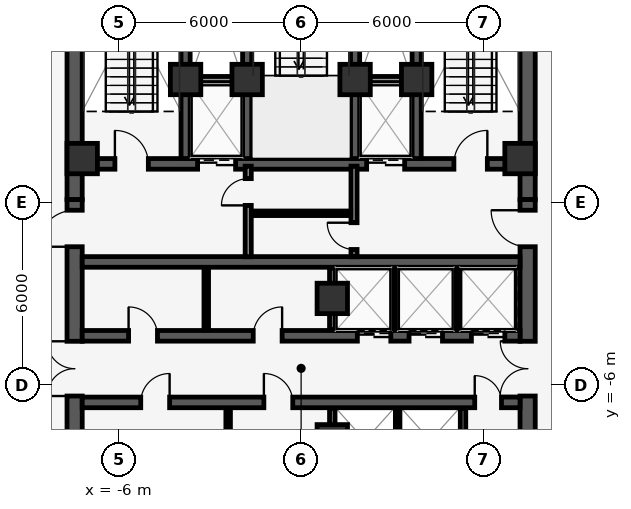
"""IFC4 building model, lengths in metres.
Left out: names, types, materials, properties, quantities, classifications, styles, units other than length and angle.
Written with IfcOpenShell. Run it as: python <this file> out.ifc"""

import sys

from ifc_helpers import new_model, si_unit, direction, frame, frame_2d, origin, origin_2d, place, context, subcontext, project, spatial, rectangle, extrude, element, fill, save


model = new_model("IFC4")
c1 = context("Model", 3, precision=1e-05, world=origin(), true_north=direction((0.0, 1.0)))
c2 = subcontext(c1, "Body", "Model", "MODEL_VIEW")
j1 = project(units=[si_unit("LENGTHUNIT", "METRE"), si_unit("PLANEANGLEUNIT", "RADIAN")], contexts=[c1])
p1 = place(None, origin())
s1 = spatial("IfcSite", under=j1, at=p1, CompositionType="ELEMENT")
p2 = place(p1, origin())
s2 = spatial("IfcBuilding", under=s1, at=p2, CompositionType="ELEMENT")
p3 = place(p2, frame((0.0, 0.0, 260.9)))
s3 = spatial("IfcBuildingStorey", under=s2, at=p3, CompositionType="ELEMENT", Elevation=260.9)
p4 = place(p3, frame((-7.2, 1.275, 0.0), z_axis=(0.0, 0.0, 1.0), x_axis=(1.0, 0.0, 0.0)))
e1 = element("IfcWall", 1, at=p4, inside=s3, PredefinedType="SHEAR", context=c2, shape_type="SweptSolid", body=[
    extrude(rectangle(XDim=14.4, YDim=0.35, at=frame_2d((7.2, 0.0))), origin(), (0.0, 0.0, 1.0), 4.35),
])
p5 = place(p4, frame((3.795, 0.0, 0.0)))
e2 = element("IfcOpeningElement", 2, at=p5, cuts=e1, PredefinedType="OPENING", context=c2, shape_type="SweptSolid", body=[
    extrude(rectangle(XDim=1.25, YDim=2.25, at=frame_2d((0.625, 1.125))), frame((0.0, 0.185, 0.0), z_axis=(0.0, -1.0, 0.0), x_axis=(1.0, 0.0, 0.0)), (0.0, 0.0, 1.0), 0.37),
])
p6 = place(p4, frame((9.355, 0.0, 0.0)))
e3 = element("IfcOpeningElement", 3, at=p6, cuts=e1, PredefinedType="OPENING", context=c2, shape_type="SweptSolid", body=[
    extrude(rectangle(XDim=1.25, YDim=2.25, at=frame_2d((0.625, 1.125))), frame((0.0, 0.185, 0.0), z_axis=(0.0, -1.0, 0.0), x_axis=(1.0, 0.0, 0.0)), (0.0, 0.0, 1.0), 0.37),
])
p7 = place(p4, frame((1.075, 0.0, 0.0)))
e4 = element("IfcOpeningElement", 4, at=p7, cuts=e1, PredefinedType="OPENING", context=c2, shape_type="SweptSolid", body=[
    extrude(rectangle(XDim=1.1, YDim=2.15, at=frame_2d((0.55, 1.075))), frame((0.0, 0.185, 0.0), z_axis=(0.0, -1.0, 0.0), x_axis=(1.0, 0.0, 0.0)), (0.0, 0.0, 1.0), 0.37),
])
p8 = place(p4, frame((12.225, 0.0, 0.0)))
e5 = element("IfcOpeningElement", 5, at=p8, cuts=e1, PredefinedType="OPENING", context=c2, shape_type="SweptSolid", body=[
    extrude(rectangle(XDim=1.1, YDim=2.15, at=frame_2d((0.55, 1.075))), frame((0.0, 0.185, 0.0), z_axis=(0.0, -1.0, 0.0), x_axis=(1.0, 0.0, 0.0)), (0.0, 0.0, 1.0), 0.37),
])
for number, where, z_axis, x_axis in (
    (6, (-3.8, 1.45, 0.0), (0.0, 0.0, 1.0), (0.0, 1.0, 0.0)),
    (7, (-1.775, 1.45, 0.0), (0.0, 0.0, 1.0), (0.0, 1.0, 0.0)),
    (8, (1.775, 1.45, 0.0), (0.0, 0.0, 1.0), (0.0, 1.0, 0.0)),
    (9, (3.8, 1.45, 0.0), (0.0, 0.0, 1.0), (0.0, 1.0, 0.0)),
):
    element("IfcWall", number, at=place(p3, frame(where, z_axis=z_axis, x_axis=x_axis)), inside=s3, PredefinedType="SHEAR", context=c2, shape_type="SweptSolid", body=[
        extrude(rectangle(XDim=7.7, YDim=0.3, at=frame_2d((3.85, 0.0))), origin(), (0.0, 0.0, 1.0), 4.35),
    ])
for number, where, z_axis, x_axis in (
    (10, (-7.45, 0.1, 0.0), (0.0, 0.0, 1.0), (0.0, 1.0, 0.0)),
    (11, (7.45, 0.1, 0.0), (0.0, 0.0, 1.0), (0.0, 1.0, 0.0)),
):
    element("IfcWall", number, at=place(p3, frame(where, z_axis=z_axis, x_axis=x_axis)), inside=s3, PredefinedType="SHEAR", context=c2, shape_type="SweptSolid", body=[
        extrude(rectangle(XDim=9.05, YDim=0.5, at=frame_2d((4.525, 0.0))), origin(), (0.0, 0.0, 1.0), 4.35),
    ])
p9 = place(p3, frame((-7.45, -9.0, 0.0), z_axis=(0.0, 0.0, 1.0), x_axis=(0.0, 1.0, 0.0)))
e12 = element("IfcWall", 12, at=p9, inside=s3, PredefinedType="SHEAR", context=c2, shape_type="SweptSolid", body=[
    extrude(rectangle(XDim=9.1, YDim=0.5, at=frame_2d((4.55, 0.0))), origin(), (0.0, 0.0, 1.0), 4.35),
])
p10 = place(p9, frame((2.64, 0.0, 0.0)))
e13 = element("IfcOpeningElement", 13, at=p10, cuts=e12, PredefinedType="OPENING", context=c2, shape_type="SweptSolid", body=[
    extrude(rectangle(XDim=1.8, YDim=2.2, at=frame_2d((0.9, 1.1))), frame((0.0, 0.26, 0.0), z_axis=(0.0, -1.0, 0.0), x_axis=(1.0, 0.0, 0.0)), (0.0, 0.0, 1.0), 0.52),
])
p11 = place(p9, frame((7.55, 0.0, 0.0)))
e14 = element("IfcOpeningElement", 14, at=p11, cuts=e12, PredefinedType="OPENING", context=c2, shape_type="SweptSolid", body=[
    extrude(rectangle(XDim=1.2, YDim=2.15, at=frame_2d((0.6, 1.075))), frame((0.0, 0.26, 0.0), z_axis=(0.0, -1.0, 0.0), x_axis=(1.0, 0.0, 0.0)), (0.0, 0.0, 1.0), 0.52),
])
p12 = place(p3, frame((7.45, -9.0, 0.0), z_axis=(0.0, 0.0, 1.0), x_axis=(0.0, 1.0, 0.0)))
e15 = element("IfcWall", 15, at=p12, inside=s3, PredefinedType="SHEAR", context=c2, shape_type="SweptSolid", body=[
    extrude(rectangle(XDim=9.1, YDim=0.5, at=frame_2d((4.55, 0.0))), origin(), (0.0, 0.0, 1.0), 4.35),
])
p13 = place(p12, frame((2.64, 0.0, 0.0)))
e16 = element("IfcOpeningElement", 16, at=p13, cuts=e15, PredefinedType="OPENING", context=c2, shape_type="SweptSolid", body=[
    extrude(rectangle(XDim=1.8, YDim=2.2, at=frame_2d((0.9, 1.1))), frame((0.0, 0.26, 0.0), z_axis=(0.0, -1.0, 0.0), x_axis=(1.0, 0.0, 0.0)), (0.0, 0.0, 1.0), 0.52),
])
p14 = place(p12, frame((7.55, 0.0, 0.0)))
e17 = element("IfcOpeningElement", 17, at=p14, cuts=e15, PredefinedType="OPENING", context=c2, shape_type="SweptSolid", body=[
    extrude(rectangle(XDim=1.2, YDim=2.15, at=frame_2d((0.6, 1.075))), frame((0.0, 0.26, 0.0), z_axis=(0.0, -1.0, 0.0), x_axis=(1.0, 0.0, 0.0)), (0.0, 0.0, 1.0), 0.52),
])
p15 = place(p3, frame((-7.2, -1.95, 0.0), z_axis=(0.0, 0.0, 1.0), x_axis=(1.0, 0.0, 0.0)))
e18 = element("IfcWall", 18, at=p15, inside=s3, PredefinedType="SHEAR", context=c2, shape_type="SweptSolid", body=[
    extrude(rectangle(XDim=14.4, YDim=0.35, at=frame_2d((7.2, 0.0))), origin(), (0.0, 0.0, 1.0), 4.35),
])
p16 = place(p3, frame((-7.2, -4.38, 0.0), z_axis=(0.0, 0.0, 1.0), x_axis=(1.0, 0.0, 0.0)))
e19 = element("IfcWall", 19, at=p16, inside=s3, PredefinedType="SHEAR", context=c2, shape_type="SweptSolid", body=[
    extrude(rectangle(XDim=14.4, YDim=0.35, at=frame_2d((7.2, 0.0))), origin(), (0.0, 0.0, 1.0), 4.35),
])
p17 = place(p16, frame((9.05, 0.0, 0.0)))
e20 = element("IfcOpeningElement", 20, at=p17, cuts=e19, PredefinedType="OPENING", context=c2, shape_type="SweptSolid", body=[
    extrude(rectangle(XDim=1.1, YDim=2.2, at=frame_2d((0.55, 1.1))), frame((0.0, 0.185, 0.0), z_axis=(0.0, -1.0, 0.0), x_axis=(1.0, 0.0, 0.0)), (0.0, 0.0, 1.0), 0.37),
])
p18 = place(p16, frame((10.75, 0.0, 0.0)))
e21 = element("IfcOpeningElement", 21, at=p18, cuts=e19, PredefinedType="OPENING", context=c2, shape_type="SweptSolid", body=[
    extrude(rectangle(XDim=1.1, YDim=2.2, at=frame_2d((0.55, 1.1))), frame((0.0, 0.185, 0.0), z_axis=(0.0, -1.0, 0.0), x_axis=(1.0, 0.0, 0.0)), (0.0, 0.0, 1.0), 0.37),
])
p19 = place(p16, frame((12.8, 0.0, 0.0)))
e22 = element("IfcOpeningElement", 22, at=p19, cuts=e19, PredefinedType="OPENING", context=c2, shape_type="SweptSolid", body=[
    extrude(rectangle(XDim=1.1, YDim=2.2, at=frame_2d((0.55, 1.1))), frame((0.0, 0.185, 0.0), z_axis=(0.0, -1.0, 0.0), x_axis=(1.0, 0.0, 0.0)), (0.0, 0.0, 1.0), 0.37),
])
p20 = place(p16, frame((1.525, 0.0, 0.0)))
e23 = element("IfcOpeningElement", 23, at=p20, cuts=e19, PredefinedType="OPENING", context=c2, shape_type="SweptSolid", body=[
    extrude(rectangle(XDim=0.95, YDim=2.15, at=frame_2d((0.475, 1.075))), frame((0.0, 0.185, 0.0), z_axis=(0.0, -1.0, 0.0), x_axis=(1.0, 0.0, 0.0)), (0.0, 0.0, 1.0), 0.37),
])
p21 = place(p16, frame((5.625, 0.0, 0.0)))
e24 = element("IfcOpeningElement", 24, at=p21, cuts=e19, PredefinedType="OPENING", context=c2, shape_type="SweptSolid", body=[
    extrude(rectangle(XDim=0.95, YDim=2.15, at=frame_2d((0.475, 1.075))), frame((0.0, 0.185, 0.0), z_axis=(0.0, -1.0, 0.0), x_axis=(1.0, 0.0, 0.0)), (0.0, 0.0, 1.0), 0.37),
])
p22 = place(p3, frame((-7.2, -6.57, 0.0), z_axis=(0.0, 0.0, 1.0), x_axis=(1.0, 0.0, 0.0)))
e25 = element("IfcWall", 25, at=p22, inside=s3, PredefinedType="SHEAR", context=c2, shape_type="SweptSolid", body=[
    extrude(rectangle(XDim=14.4, YDim=0.35, at=frame_2d((7.2, 0.0))), origin(), (0.0, 0.0, 1.0), 4.35),
])
p23 = place(p22, frame((1.925, 0.0, 0.0)))
e26 = element("IfcOpeningElement", 26, at=p23, cuts=e25, PredefinedType="OPENING", context=c2, shape_type="SweptSolid", body=[
    extrude(rectangle(XDim=0.95, YDim=2.15, at=frame_2d((0.475, 1.075))), frame((0.0, 0.185, 0.0), z_axis=(0.0, -1.0, 0.0), x_axis=(1.0, 0.0, 0.0)), (0.0, 0.0, 1.0), 0.37),
])
p24 = place(p22, frame((5.975, 0.0, 0.0)))
e27 = element("IfcOpeningElement", 27, at=p24, cuts=e25, PredefinedType="OPENING", context=c2, shape_type="SweptSolid", body=[
    extrude(rectangle(XDim=0.95, YDim=2.15, at=frame_2d((0.475, 1.075))), frame((0.0, 0.185, 0.0), z_axis=(0.0, -1.0, 0.0), x_axis=(1.0, 0.0, 0.0)), (0.0, 0.0, 1.0), 0.37),
])
p25 = place(p22, frame((12.91, 0.0, 0.0)))
e28 = element("IfcOpeningElement", 28, at=p25, cuts=e25, PredefinedType="OPENING", context=c2, shape_type="SweptSolid", body=[
    extrude(rectangle(XDim=0.88, YDim=2.15, at=frame_2d((0.44, 1.075))), frame((0.0, 0.185, 0.0), z_axis=(0.0, -1.0, 0.0), x_axis=(1.0, 0.0, 0.0)), (0.0, 0.0, 1.0), 0.37),
])
for number, where, z_axis, x_axis in (
    (29, (7.2, 1.45, 0.0), (0.0, 0.0, 1.0), (1.0, 0.0, 0.0)),
    (30, (-7.2, 1.45, 0.0), (0.0, 0.0, 1.0), (1.0, 0.0, 0.0)),
    (31, (-3.8, 4.05, 0.0), (0.0, 0.0, 1.0), (1.0, 0.0, 0.0)),
    (32, (3.8, 4.05, 0.0), (0.0, 0.0, 1.0), (1.0, 0.0, 0.0)),
    (33, (-1.775, 4.05, 0.0), (0.0, 0.0, 1.0), (1.0, 0.0, 0.0)),
    (34, (1.775, 4.05, 0.0), (0.0, 0.0, 1.0), (1.0, 0.0, 0.0)),
    (35, (1.025, -3.15, 0.0), (0.0, 0.0, 1.0), (1.0, 0.0, 0.0)),
    (36, (1.025, -7.8, 0.0), (0.0, 0.0, 1.0), (1.0, 0.0, 0.0)),
):
    element("IfcColumn", number, at=place(p3, frame(where, z_axis=z_axis, x_axis=x_axis)), inside=s3, PredefinedType="COLUMN", context=c2, shape_type="SweptSolid", body=[
        extrude(rectangle(XDim=1.0, YDim=1.0, at=origin_2d()), origin(), (0.0, 0.0, 1.0), 4.6),
    ])
p26 = place(p3, frame((28.531, 6.268, 0.0), z_axis=(0.0, 0.0, 1.0), x_axis=(-0.656055748756, -0.754712431674, 0.0)))
e37 = element("IfcWall", 37, at=p26, inside=s3, PredefinedType="STANDARD", context=c2, shape_type="SweptSolid", body=[
    extrude(rectangle(XDim=46.897, YDim=0.28, at=frame_2d((23.448, 0.0))), origin(), (0.0, 0.0, 1.0), 4.35),
])
p27 = place(p26, frame((6.099, 0.0, 0.85)))
e38 = element("IfcOpeningElement", 38, at=p27, cuts=e37, PredefinedType="OPENING", context=c2, shape_type="SweptSolid", body=[
    extrude(rectangle(XDim=1.1, YDim=2.15, at=frame_2d((0.55, 1.075))), frame((0.0, 0.15, 0.0), z_axis=(0.0, -1.0, 0.0), x_axis=(1.0, 0.0, 0.0)), (0.0, 0.0, 1.0), 0.3),
])
p28 = place(p26, frame((11.698, 0.0, 0.85)))
e39 = element("IfcOpeningElement", 39, at=p28, cuts=e37, PredefinedType="OPENING", context=c2, shape_type="SweptSolid", body=[
    extrude(rectangle(XDim=1.1, YDim=2.15, at=frame_2d((0.55, 1.075))), frame((0.0, 0.15, 0.0), z_axis=(0.0, -1.0, 0.0), x_axis=(1.0, 0.0, 0.0)), (0.0, 0.0, 1.0), 0.3),
])
p29 = place(p26, frame((39.698, 0.0, 0.85)))
e40 = element("IfcOpeningElement", 40, at=p29, cuts=e37, PredefinedType="OPENING", context=c2, shape_type="SweptSolid", body=[
    extrude(rectangle(XDim=1.1, YDim=2.15, at=frame_2d((0.55, 1.075))), frame((0.0, 0.15, 0.0), z_axis=(0.0, -1.0, 0.0), x_axis=(1.0, 0.0, 0.0)), (0.0, 0.0, 1.0), 0.3),
])
for number, where, z_axis, x_axis in (
    (41, (-3.65, 4.05, 0.0), (0.0, 0.0, 1.0), (1.0, 0.0, 0.0)),
    (42, (1.92, 4.05, 0.0), (0.0, 0.0, 1.0), (1.0, 0.0, 0.0)),
):
    element("IfcWall", number, at=place(p3, frame(where, z_axis=z_axis, x_axis=x_axis)), inside=s3, PredefinedType="PARTITIONING", context=c2, shape_type="SweptSolid", body=[
        extrude(rectangle(XDim=1.73, YDim=0.2, at=frame_2d((0.865, 0.0))), origin(), (0.0, 0.0, 1.0), 4.35),
    ])
p30 = place(p3, frame((1.025, -4.18, 0.0), z_axis=(0.0, 0.0, 1.0), x_axis=(0.0, 1.0, 0.0)))
e43 = element("IfcWall", 43, at=p30, inside=s3, PredefinedType="PARTITIONING", context=c2, shape_type="SweptSolid", body=[
    extrude(rectangle(XDim=2.03, YDim=0.18, at=frame_2d((1.015, 0.0))), origin(), (0.0, 0.0, 1.0), 3.398),
])
for number, where, z_axis, x_axis in (
    (44, (-3.12, -4.18, 0.0), (0.0, 0.0, 1.0), (0.0, 1.0, 0.0)),
    (45, (3.075, -4.18, 0.0), (0.0, 0.0, 1.0), (0.0, 1.0, 0.0)),
    (46, (5.125, -4.18, 0.0), (0.0, 0.0, 1.0), (0.0, 1.0, 0.0)),
):
    element("IfcWall", number, at=place(p3, frame(where, z_axis=z_axis, x_axis=x_axis)), inside=s3, PredefinedType="PARTITIONING", context=c2, shape_type="SweptSolid", body=[
        extrude(rectangle(XDim=2.03, YDim=0.15, at=frame_2d((1.015, 0.0))), origin(), (0.0, 0.0, 1.0), 4.35),
    ])
p31 = place(p3, frame((1.025, -8.85, 0.0), z_axis=(0.0, 0.0, 1.0), x_axis=(0.0, 1.0, 0.0)))
e47 = element("IfcWall", 47, at=p31, inside=s3, PredefinedType="PARTITIONING", context=c2, shape_type="SweptSolid", body=[
    extrude(rectangle(XDim=2.08, YDim=0.18, at=frame_2d((1.04, 0.0))), origin(), (0.0, 0.0, 1.0), 3.398),
])
for number, where, z_axis, x_axis in (
    (48, (-2.4, -8.85, 0.0), (0.0, 0.0, 1.0), (0.0, 1.0, 0.0)),
    (49, (3.175, -8.85, 0.0), (0.0, 0.0, 1.0), (0.0, 1.0, 0.0)),
):
    element("IfcWall", number, at=place(p3, frame(where, z_axis=z_axis, x_axis=x_axis)), inside=s3, PredefinedType="PARTITIONING", context=c2, shape_type="SweptSolid", body=[
        extrude(rectangle(XDim=2.08, YDim=0.15, at=frame_2d((1.04, 0.0))), origin(), (0.0, 0.0, 1.0), 4.35),
    ])
p32 = place(p3, frame((5.325, -8.85, 0.0), z_axis=(0.0, 0.0, 1.0), x_axis=(0.0, 1.0, 0.0)))
e50 = element("IfcWall", 50, at=p32, inside=s3, PredefinedType="PARTITIONING", context=c2, shape_type="SweptSolid", body=[
    extrude(rectangle(XDim=2.08, YDim=0.18, at=frame_2d((1.04, 0.0))), origin(), (0.0, 0.0, 1.0), 4.35),
])
p33 = place(p3, frame((-1.74, -1.78, 0.0), z_axis=(0.0, 0.0, 1.0), x_axis=(0.0, 1.0, 0.0)))
e51 = element("IfcWall", 51, at=p33, inside=s3, PredefinedType="PARTITIONING", context=c2, shape_type="SweptSolid", body=[
    extrude(rectangle(XDim=2.98, YDim=0.2, at=frame_2d((1.49, 0.0))), origin(), (0.0, 0.0, 1.0), 4.35),
])
p34 = place(p33, frame((1.69, 0.0, 0.0)))
e52 = element("IfcOpeningElement", 52, at=p34, cuts=e51, PredefinedType="OPENING", context=c2, shape_type="SweptSolid", body=[
    extrude(rectangle(XDim=0.88, YDim=2.15, at=frame_2d((0.44, 1.075))), frame((0.0, 0.11, 0.0), z_axis=(0.0, -1.0, 0.0), x_axis=(1.0, 0.0, 0.0)), (0.0, 0.0, 1.0), 0.22),
])
p35 = place(p3, frame((1.74, -1.78, 0.0), z_axis=(0.0, 0.0, 1.0), x_axis=(0.0, 1.0, 0.0)))
e53 = element("IfcWall", 53, at=p35, inside=s3, PredefinedType="PARTITIONING", context=c2, shape_type="SweptSolid", body=[
    extrude(rectangle(XDim=2.98, YDim=0.2, at=frame_2d((1.49, 0.0))), origin(), (0.0, 0.0, 1.0), 4.35),
])
p36 = place(p35, frame((0.24, 0.0, 0.0)))
e54 = element("IfcOpeningElement", 54, at=p36, cuts=e53, PredefinedType="OPENING", context=c2, shape_type="SweptSolid", body=[
    extrude(rectangle(XDim=0.88, YDim=2.15, at=frame_2d((0.44, 1.075))), frame((0.0, 0.11, 0.0), z_axis=(0.0, -1.0, 0.0), x_axis=(1.0, 0.0, 0.0)), (0.0, 0.0, 1.0), 0.22),
])
p37 = place(p3, frame((-1.63, -0.35, 0.0), z_axis=(0.0, 0.0, 1.0), x_axis=(1.0, 0.0, 0.0)))
e55 = element("IfcWall", 55, at=p37, inside=s3, PredefinedType="PARTITIONING", context=c2, shape_type="SweptSolid", body=[
    extrude(rectangle(XDim=3.26, YDim=0.15, at=frame_2d((1.63, 0.0))), origin(), (0.0, 0.0, 1.0), 4.35),
])
p38 = place(p17, origin())
e56 = element("IfcDoor", 56, at=p38, inside=s3, OperationType="DOUBLE_DOOR_SLIDING", PredefinedType="DOOR", context=c2, shape_type="SweptSolid", body=[
    extrude(rectangle(XDim=1.1, YDim=2.2, at=frame_2d((0.55, 1.1))), frame((0.0, 0.025, 0.0), z_axis=(0.0, -1.0, 0.0), x_axis=(1.0, 0.0, 0.0)), (0.0, 0.0, 1.0), 0.05),
])
fill(e20, e56)
p39 = place(p18, origin())
e57 = element("IfcDoor", 57, at=p39, inside=s3, OperationType="DOUBLE_DOOR_SLIDING", PredefinedType="DOOR", context=c2, shape_type="SweptSolid", body=[
    extrude(rectangle(XDim=1.1, YDim=2.2, at=frame_2d((0.55, 1.1))), frame((0.0, 0.025, 0.0), z_axis=(0.0, -1.0, 0.0), x_axis=(1.0, 0.0, 0.0)), (0.0, 0.0, 1.0), 0.05),
])
fill(e21, e57)
p40 = place(p19, origin())
e58 = element("IfcDoor", 58, at=p40, inside=s3, OperationType="DOUBLE_DOOR_SLIDING", PredefinedType="DOOR", context=c2, shape_type="SweptSolid", body=[
    extrude(rectangle(XDim=1.1, YDim=2.2, at=frame_2d((0.55, 1.1))), frame((0.0, 0.025, 0.0), z_axis=(0.0, -1.0, 0.0), x_axis=(1.0, 0.0, 0.0)), (0.0, 0.0, 1.0), 0.05),
])
fill(e22, e58)
p41 = place(p5, origin())
e59 = element("IfcDoor", 59, at=p41, inside=s3, OperationType="DOUBLE_DOOR_SLIDING", PredefinedType="DOOR", context=c2, shape_type="SweptSolid", body=[
    extrude(rectangle(XDim=1.25, YDim=2.25, at=frame_2d((0.625, 1.125))), frame((0.0, 0.025, 0.0), z_axis=(0.0, -1.0, 0.0), x_axis=(1.0, 0.0, 0.0)), (0.0, 0.0, 1.0), 0.05),
])
fill(e2, e59)
p42 = place(p6, origin())
e60 = element("IfcDoor", 60, at=p42, inside=s3, OperationType="DOUBLE_DOOR_SLIDING", PredefinedType="DOOR", context=c2, shape_type="SweptSolid", body=[
    extrude(rectangle(XDim=1.25, YDim=2.25, at=frame_2d((0.625, 1.125))), frame((0.0, 0.025, 0.0), z_axis=(0.0, -1.0, 0.0), x_axis=(1.0, 0.0, 0.0)), (0.0, 0.0, 1.0), 0.05),
])
fill(e3, e60)
p43 = place(p7, origin())
e61 = element("IfcDoor", 61, at=p43, inside=s3, OperationType="SINGLE_SWING_LEFT", PredefinedType="DOOR", context=c2, shape_type="SweptSolid", body=[
    extrude(rectangle(XDim=1.1, YDim=2.15, at=frame_2d((0.55, 1.075))), frame((0.0, 0.025, 0.0), z_axis=(0.0, -1.0, 0.0), x_axis=(1.0, 0.0, 0.0)), (0.0, 0.0, 1.0), 0.05),
])
fill(e4, e61)
p44 = place(p8, origin())
e62 = element("IfcDoor", 62, at=p44, inside=s3, OperationType="SINGLE_SWING_RIGHT", PredefinedType="DOOR", context=c2, shape_type="SweptSolid", body=[
    extrude(rectangle(XDim=1.1, YDim=2.15, at=frame_2d((0.55, 1.075))), frame((0.0, 0.025, 0.0), z_axis=(0.0, -1.0, 0.0), x_axis=(1.0, 0.0, 0.0)), (0.0, 0.0, 1.0), 0.05),
])
fill(e5, e62)
p45 = place(p10, origin())
e63 = element("IfcDoor", 63, at=p45, inside=s3, OperationType="DOUBLE_DOOR_SINGLE_SWING", PredefinedType="DOOR", context=c2, shape_type="SweptSolid", body=[
    extrude(rectangle(XDim=1.8, YDim=2.2, at=frame_2d((0.9, 1.1))), frame((0.0, 0.025, 0.0), z_axis=(0.0, -1.0, 0.0), x_axis=(1.0, 0.0, 0.0)), (0.0, 0.0, 1.0), 0.05),
])
fill(e13, e63)
p46 = place(p11, origin())
e64 = element("IfcDoor", 64, at=p46, inside=s3, OperationType="SINGLE_SWING_LEFT", PredefinedType="DOOR", context=c2, shape_type="SweptSolid", body=[
    extrude(rectangle(XDim=1.2, YDim=2.15, at=frame_2d((0.6, 1.075))), frame((0.0, 0.025, 0.0), z_axis=(0.0, -1.0, 0.0), x_axis=(1.0, 0.0, 0.0)), (0.0, 0.0, 1.0), 0.05),
])
fill(e14, e64)
p47 = place(p13, origin())
e65 = element("IfcDoor", 65, at=p47, inside=s3, OperationType="DOUBLE_DOOR_SINGLE_SWING", PredefinedType="DOOR", context=c2, shape_type="SweptSolid", body=[
    extrude(rectangle(XDim=1.8, YDim=2.2, at=frame_2d((0.9, 1.1))), frame((0.0, 0.025, 0.0), z_axis=(0.0, -1.0, 0.0), x_axis=(1.0, 0.0, 0.0)), (0.0, 0.0, 1.0), 0.05),
])
fill(e16, e65)
p48 = place(p14, origin())
e66 = element("IfcDoor", 66, at=p48, inside=s3, OperationType="SINGLE_SWING_RIGHT", PredefinedType="DOOR", context=c2, shape_type="SweptSolid", body=[
    extrude(rectangle(XDim=1.2, YDim=2.15, at=frame_2d((0.6, 1.075))), frame((0.0, 0.025, 0.0), z_axis=(0.0, -1.0, 0.0), x_axis=(1.0, 0.0, 0.0)), (0.0, 0.0, 1.0), 0.05),
])
fill(e17, e66)
p49 = place(p20, origin())
e67 = element("IfcDoor", 67, at=p49, inside=s3, OperationType="SINGLE_SWING_LEFT", PredefinedType="DOOR", context=c2, shape_type="SweptSolid", body=[
    extrude(rectangle(XDim=0.95, YDim=2.15, at=frame_2d((0.475, 1.075))), frame((0.0, 0.025, 0.0), z_axis=(0.0, -1.0, 0.0), x_axis=(1.0, 0.0, 0.0)), (0.0, 0.0, 1.0), 0.05),
])
fill(e23, e67)
p50 = place(p21, origin())
e68 = element("IfcDoor", 68, at=p50, inside=s3, OperationType="SINGLE_SWING_RIGHT", PredefinedType="DOOR", context=c2, shape_type="SweptSolid", body=[
    extrude(rectangle(XDim=0.95, YDim=2.15, at=frame_2d((0.475, 1.075))), frame((0.0, 0.025, 0.0), z_axis=(0.0, -1.0, 0.0), x_axis=(1.0, 0.0, 0.0)), (0.0, 0.0, 1.0), 0.05),
])
fill(e24, e68)
p51 = place(p23, origin())
e69 = element("IfcDoor", 69, at=p51, inside=s3, OperationType="SINGLE_SWING_RIGHT", PredefinedType="DOOR", context=c2, shape_type="SweptSolid", body=[
    extrude(rectangle(XDim=0.95, YDim=2.15, at=frame_2d((0.475, 1.075))), frame((0.0, 0.025, 0.0), z_axis=(0.0, -1.0, 0.0), x_axis=(1.0, 0.0, 0.0)), (0.0, 0.0, 1.0), 0.05),
])
fill(e26, e69)
p52 = place(p24, origin())
e70 = element("IfcDoor", 70, at=p52, inside=s3, OperationType="SINGLE_SWING_LEFT", PredefinedType="DOOR", context=c2, shape_type="SweptSolid", body=[
    extrude(rectangle(XDim=0.95, YDim=2.15, at=frame_2d((0.475, 1.075))), frame((0.0, 0.025, 0.0), z_axis=(0.0, -1.0, 0.0), x_axis=(1.0, 0.0, 0.0)), (0.0, 0.0, 1.0), 0.05),
])
fill(e27, e70)
p53 = place(p25, origin())
e71 = element("IfcDoor", 71, at=p53, inside=s3, OperationType="SINGLE_SWING_LEFT", PredefinedType="DOOR", context=c2, shape_type="SweptSolid", body=[
    extrude(rectangle(XDim=0.88, YDim=2.15, at=frame_2d((0.44, 1.075))), frame((0.0, 0.025, 0.0), z_axis=(0.0, -1.0, 0.0), x_axis=(1.0, 0.0, 0.0)), (0.0, 0.0, 1.0), 0.05),
])
fill(e28, e71)
p54 = place(p34, origin())
e72 = element("IfcDoor", 72, at=p54, inside=s3, OperationType="SINGLE_SWING_LEFT", PredefinedType="DOOR", context=c2, shape_type="SweptSolid", body=[
    extrude(rectangle(XDim=0.88, YDim=2.15, at=frame_2d((0.44, 1.075))), frame((0.0, 0.025, 0.0), z_axis=(0.0, -1.0, 0.0), x_axis=(1.0, 0.0, 0.0)), (0.0, 0.0, 1.0), 0.05),
])
fill(e52, e72)
p55 = place(p36, origin())
e73 = element("IfcDoor", 73, at=p55, inside=s3, OperationType="SINGLE_SWING_RIGHT", PredefinedType="DOOR", context=c2, shape_type="SweptSolid", body=[
    extrude(rectangle(XDim=0.88, YDim=2.15, at=frame_2d((0.44, 1.075))), frame((0.0, 0.025, 0.0), z_axis=(0.0, -1.0, 0.0), x_axis=(1.0, 0.0, 0.0)), (0.0, 0.0, 1.0), 0.05),
])
fill(e54, e73)
save(model, sys.argv[1])
